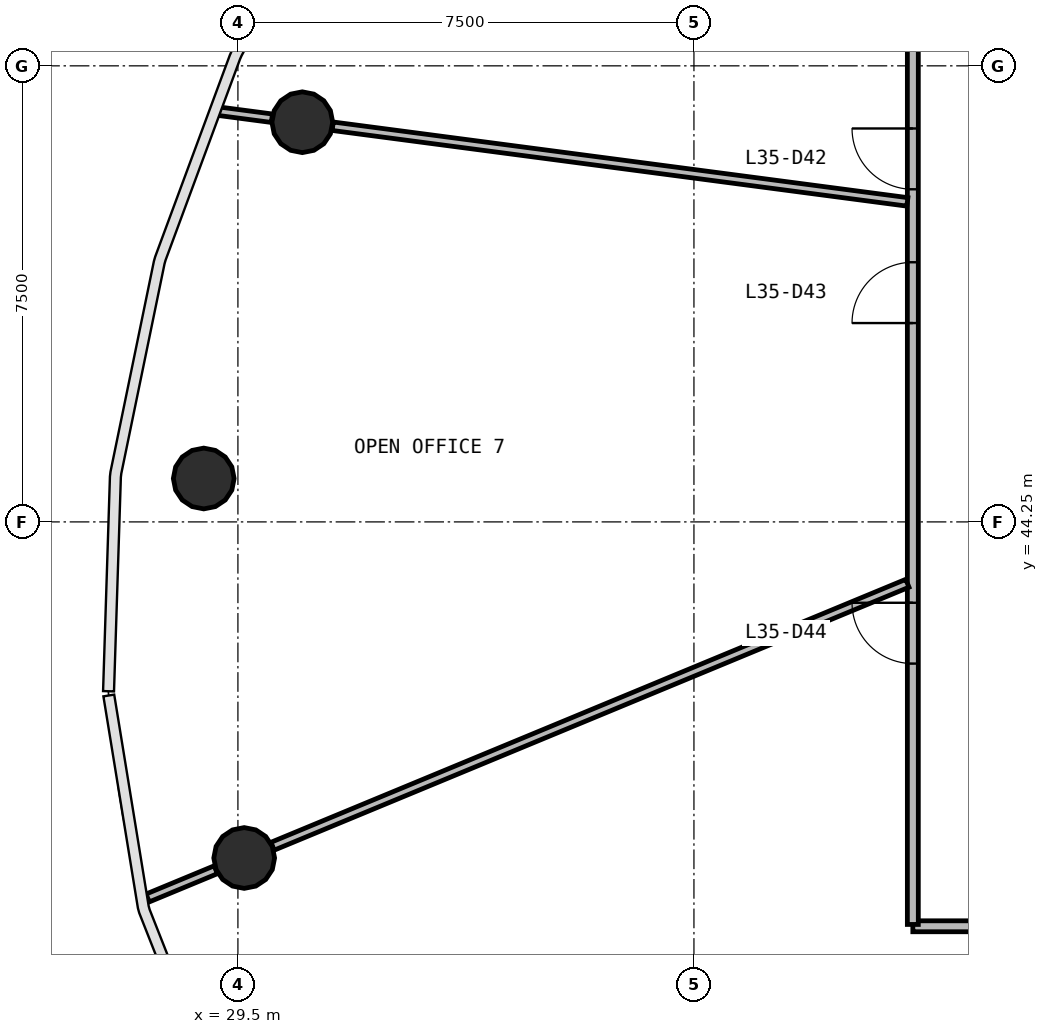
"""IFC4 building model, lengths in metres.
Left out: names, types, materials, properties, quantities, classifications, styles, units other than length and angle.
Written with IfcOpenShell. Run it as: python <this file> out.ifc"""

import sys

from ifc_helpers import new_model, si_unit, direction, frame, frame_2d, origin, origin_2d, place, context, subcontext, project, spatial, rectangle, circle, extrude, source, transform, mapped, element, fill, save


model = new_model("IFC4")
c1 = context("Model", 3, precision=1e-05, world=origin(), true_north=direction((0.0, 1.0)))
c2 = subcontext(c1, "Body", "Model", "MODEL_VIEW")
j1 = project(units=[si_unit("LENGTHUNIT", "METRE"), si_unit("PLANEANGLEUNIT", "RADIAN")], contexts=[c1])
p1 = place(None, origin())
s1 = spatial("IfcSite", under=j1, at=p1, CompositionType="ELEMENT")
p2 = place(p1, origin())
s2 = spatial("IfcBuilding", under=s1, at=p2, CompositionType="ELEMENT")
p3 = place(p2, frame((0.0, 0.0, 148.7)))
s3 = spatial("IfcBuildingStorey", under=s2, at=p3, CompositionType="ELEMENT", Elevation=148.7)
m1 = source(origin(), c2, "Body", "SweptSolid", [
    extrude(circle(Radius=0.5, at=origin_2d()), origin(), (0.0, 0.0, 1.0), 3.9),
])
for number, where, z_axis, x_axis in (
    (1, (30.559, 50.823, 0.0), (0.0, 0.0, 1.0), (1.0, 0.0, 0.0)),
    (2, (28.938, 44.964, 0.0), (0.0, 0.0, 1.0), (1.0, 0.0, 0.0)),
    (3, (29.603, 38.723, 0.0), (0.0, 0.0, 1.0), (1.0, 0.0, 0.0)),
):
    element("IfcColumn", number, at=place(p3, frame(where, z_axis=z_axis, x_axis=x_axis)), inside=s3, PredefinedType="COLUMN", context=c2, shape_type="MappedRepresentation", body=[
        mapped(m1, transform((0.0, 0.0, 0.0), scale=1.0)),
    ])
p4 = place(p3, frame((63.4, 37.6, 0.0), z_axis=(0.0, 0.0, 1.0), x_axis=(-1.0, 0.0, 0.0)))
e4 = element("IfcWall", 4, at=p4, inside=s3, PredefinedType="PARTITIONING", context=c2, shape_type="SweptSolid", body=[
    extrude(rectangle(XDim=22.8, YDim=0.18, at=frame_2d((11.4, 0.0))), origin(), (0.0, 0.0, 1.0), 2.88),
])
p5 = place(p4, frame((16.05, 0.0, 0.0)))
e5 = element("IfcOpeningElement", 5, at=p5, cuts=e4, PredefinedType="OPENING", context=c2, shape_type="SweptSolid", body=[
    extrude(rectangle(XDim=0.9, YDim=2.1, at=frame_2d((0.45, 1.05))), frame((0.0, 0.1, 0.0), z_axis=(0.0, -1.0, 0.0), x_axis=(1.0, 0.0, 0.0)), (0.0, 0.0, 1.0), 0.2),
])
p6 = place(p4, frame((13.05, 0.0, 0.0)))
e6 = element("IfcOpeningElement", 6, at=p6, cuts=e4, PredefinedType="OPENING", context=c2, shape_type="SweptSolid", body=[
    extrude(rectangle(XDim=0.9, YDim=2.1, at=frame_2d((0.45, 1.05))), frame((0.0, 0.1, 0.0), z_axis=(0.0, -1.0, 0.0), x_axis=(1.0, 0.0, 0.0)), (0.0, 0.0, 1.0), 0.2),
])
p7 = place(p4, frame((10.95, 0.0, 0.0)))
e7 = element("IfcOpeningElement", 7, at=p7, cuts=e4, PredefinedType="OPENING", context=c2, shape_type="SweptSolid", body=[
    extrude(rectangle(XDim=1.0, YDim=2.1, at=frame_2d((0.5, 1.05))), frame((0.0, 0.1, 0.0), z_axis=(0.0, -1.0, 0.0), x_axis=(1.0, 0.0, 0.0)), (0.0, 0.0, 1.0), 0.2),
])
p8 = place(p4, frame((5.75, 0.0, 0.0)))
e8 = element("IfcOpeningElement", 8, at=p8, cuts=e4, PredefinedType="OPENING", context=c2, shape_type="SweptSolid", body=[
    extrude(rectangle(XDim=1.0, YDim=2.1, at=frame_2d((0.5, 1.05))), frame((0.0, 0.1, 0.0), z_axis=(0.0, -1.0, 0.0), x_axis=(1.0, 0.0, 0.0)), (0.0, 0.0, 1.0), 0.2),
])
p9 = place(p3, frame((40.6, 37.63, 0.0), z_axis=(0.0, 0.0, 1.0), x_axis=(0.0, 1.0, 0.0)))
e9 = element("IfcWall", 9, at=p9, inside=s3, PredefinedType="PARTITIONING", context=c2, shape_type="SweptSolid", body=[
    extrude(rectangle(XDim=20.74, YDim=0.18, at=frame_2d((10.37, 0.0))), origin(), (0.0, 0.0, 1.0), 2.88),
])
p10 = place(p9, frame((15.49, 0.0, 0.0)))
e10 = element("IfcOpeningElement", 10, at=p10, cuts=e9, PredefinedType="OPENING", context=c2, shape_type="SweptSolid", body=[
    extrude(rectangle(XDim=1.0, YDim=2.1, at=frame_2d((0.5, 1.05))), frame((0.0, 0.1, 0.0), z_axis=(0.0, -1.0, 0.0), x_axis=(1.0, 0.0, 0.0)), (0.0, 0.0, 1.0), 0.2),
])
p11 = place(p9, frame((12.09, 0.0, 0.0)))
e11 = element("IfcOpeningElement", 11, at=p11, cuts=e9, PredefinedType="OPENING", context=c2, shape_type="SweptSolid", body=[
    extrude(rectangle(XDim=1.0, YDim=2.1, at=frame_2d((0.5, 1.05))), frame((0.0, 0.1, 0.0), z_axis=(0.0, -1.0, 0.0), x_axis=(1.0, 0.0, 0.0)), (0.0, 0.0, 1.0), 0.2),
])
p12 = place(p9, frame((9.89, 0.0, 0.0)))
e12 = element("IfcOpeningElement", 12, at=p12, cuts=e9, PredefinedType="OPENING", context=c2, shape_type="SweptSolid", body=[
    extrude(rectangle(XDim=1.0, YDim=2.1, at=frame_2d((0.5, 1.05))), frame((0.0, 0.1, 0.0), z_axis=(0.0, -1.0, 0.0), x_axis=(1.0, 0.0, 0.0)), (0.0, 0.0, 1.0), 0.2),
])
p13 = place(p9, frame((4.29, 0.0, 0.0)))
e13 = element("IfcOpeningElement", 13, at=p13, cuts=e9, PredefinedType="OPENING", context=c2, shape_type="SweptSolid", body=[
    extrude(rectangle(XDim=1.0, YDim=2.1, at=frame_2d((0.5, 1.05))), frame((0.0, 0.1, 0.0), z_axis=(0.0, -1.0, 0.0), x_axis=(1.0, 0.0, 0.0)), (0.0, 0.0, 1.0), 0.2),
])
p14 = place(p3, frame((40.51, 43.241, 0.0), z_axis=(0.0, 0.0, 1.0), x_axis=(-0.923879643786, -0.382683163725, 0.0)))
e14 = element("IfcWall", 14, at=p14, inside=s3, PredefinedType="PARTITIONING", context=c2, shape_type="SweptSolid", body=[
    extrude(rectangle(XDim=11.3, YDim=0.14, at=frame_2d((5.65, 0.0))), origin(), (0.0, 0.0, 1.0), 2.88),
])
p15 = place(p3, frame((43.951, 37.51, 0.0), z_axis=(0.0, 0.0, 1.0), x_axis=(-0.608768467527, -0.793347939396, 0.0)))
e15 = element("IfcWall", 15, at=p15, inside=s3, PredefinedType="PARTITIONING", context=c2, shape_type="SweptSolid", body=[
    extrude(rectangle(XDim=10.297, YDim=0.14, at=frame_2d((5.148, 0.0))), origin(), (0.0, 0.0, 1.0), 2.88),
])
p16 = place(p15, frame((4.65, 0.0, 0.0)))
e16 = element("IfcOpeningElement", 16, at=p16, cuts=e15, PredefinedType="OPENING", context=c2, shape_type="SweptSolid", body=[
    extrude(rectangle(XDim=1.0, YDim=2.1, at=frame_2d((0.5, 1.05))), frame((0.0, 0.08, 0.0), z_axis=(0.0, -1.0, 0.0), x_axis=(1.0, 0.0, 0.0)), (0.0, 0.0, 1.0), 0.16),
])
p17 = place(p3, frame((40.51, 49.513, 0.0), z_axis=(0.0, 0.0, 1.0), x_axis=(-0.991446186521, 0.130516126334, 0.0)))
e17 = element("IfcWall", 17, at=p17, inside=s3, PredefinedType="PARTITIONING", context=c2, shape_type="SweptSolid", body=[
    extrude(rectangle(XDim=9.532, YDim=0.14, at=frame_2d((4.766, 0.0))), origin(), (0.0, 0.0, 1.0), 2.88),
])
p18 = place(p3, frame((29.137, 38.53, 0.0), z_axis=(0.0, 0.0, 1.0), x_axis=(-0.923842754498, -0.382772210279, 0.0)))
e18 = element("IfcWall", 18, at=p18, inside=s3, PredefinedType="PARTITIONING", context=c2, shape_type="SweptSolid", body=[
    extrude(rectangle(XDim=1.214, YDim=0.14, at=frame_2d((0.607, 0.0))), origin(), (0.0, 0.0, 1.0), 2.88),
])
p19 = place(p3, frame((30.059, 50.889, 0.0), z_axis=(0.0, 0.0, 1.0), x_axis=(-0.99146844902, 0.13034690099, 0.0)))
e19 = element("IfcWall", 19, at=p19, inside=s3, PredefinedType="PARTITIONING", context=c2, shape_type="SweptSolid", body=[
    extrude(rectangle(XDim=0.88, YDim=0.14, at=frame_2d((0.44, 0.0))), origin(), (0.0, 0.0, 1.0), 2.88),
])
m2 = source(origin(), c2, "Body", "SweptSolid", [
    extrude(rectangle(XDim=1.0, YDim=2.1, at=frame_2d((0.5, 1.05))), frame((0.0, 0.025, 0.0), z_axis=(0.0, -1.0, 0.0), x_axis=(1.0, 0.0, 0.0)), (0.0, 0.0, 1.0), 0.05),
])
p20 = place(p11, origin())
e20 = element("IfcDoor", 20, at=p20, inside=s3, OperationType="SINGLE_SWING_RIGHT", PredefinedType="DOOR", context=c2, shape_type="MappedRepresentation", body=[
    mapped(m2, transform((0.0, 0.0, 0.0), scale=1.0)),
])
fill(e11, e20)
p21 = place(p12, origin())
e21 = element("IfcDoor", 21, at=p21, inside=s3, OperationType="SINGLE_SWING_LEFT", PredefinedType="DOOR", context=c2, shape_type="MappedRepresentation", body=[
    mapped(m2, transform((0.0, 0.0, 0.0), scale=1.0)),
])
fill(e12, e21)
p22 = place(p13, origin())
e22 = element("IfcDoor", 22, at=p22, inside=s3, OperationType="SINGLE_SWING_RIGHT", PredefinedType="DOOR", context=c2, shape_type="MappedRepresentation", body=[
    mapped(m2, transform((0.0, 0.0, 0.0), scale=1.0)),
])
fill(e13, e22)
save(model, sys.argv[1])
